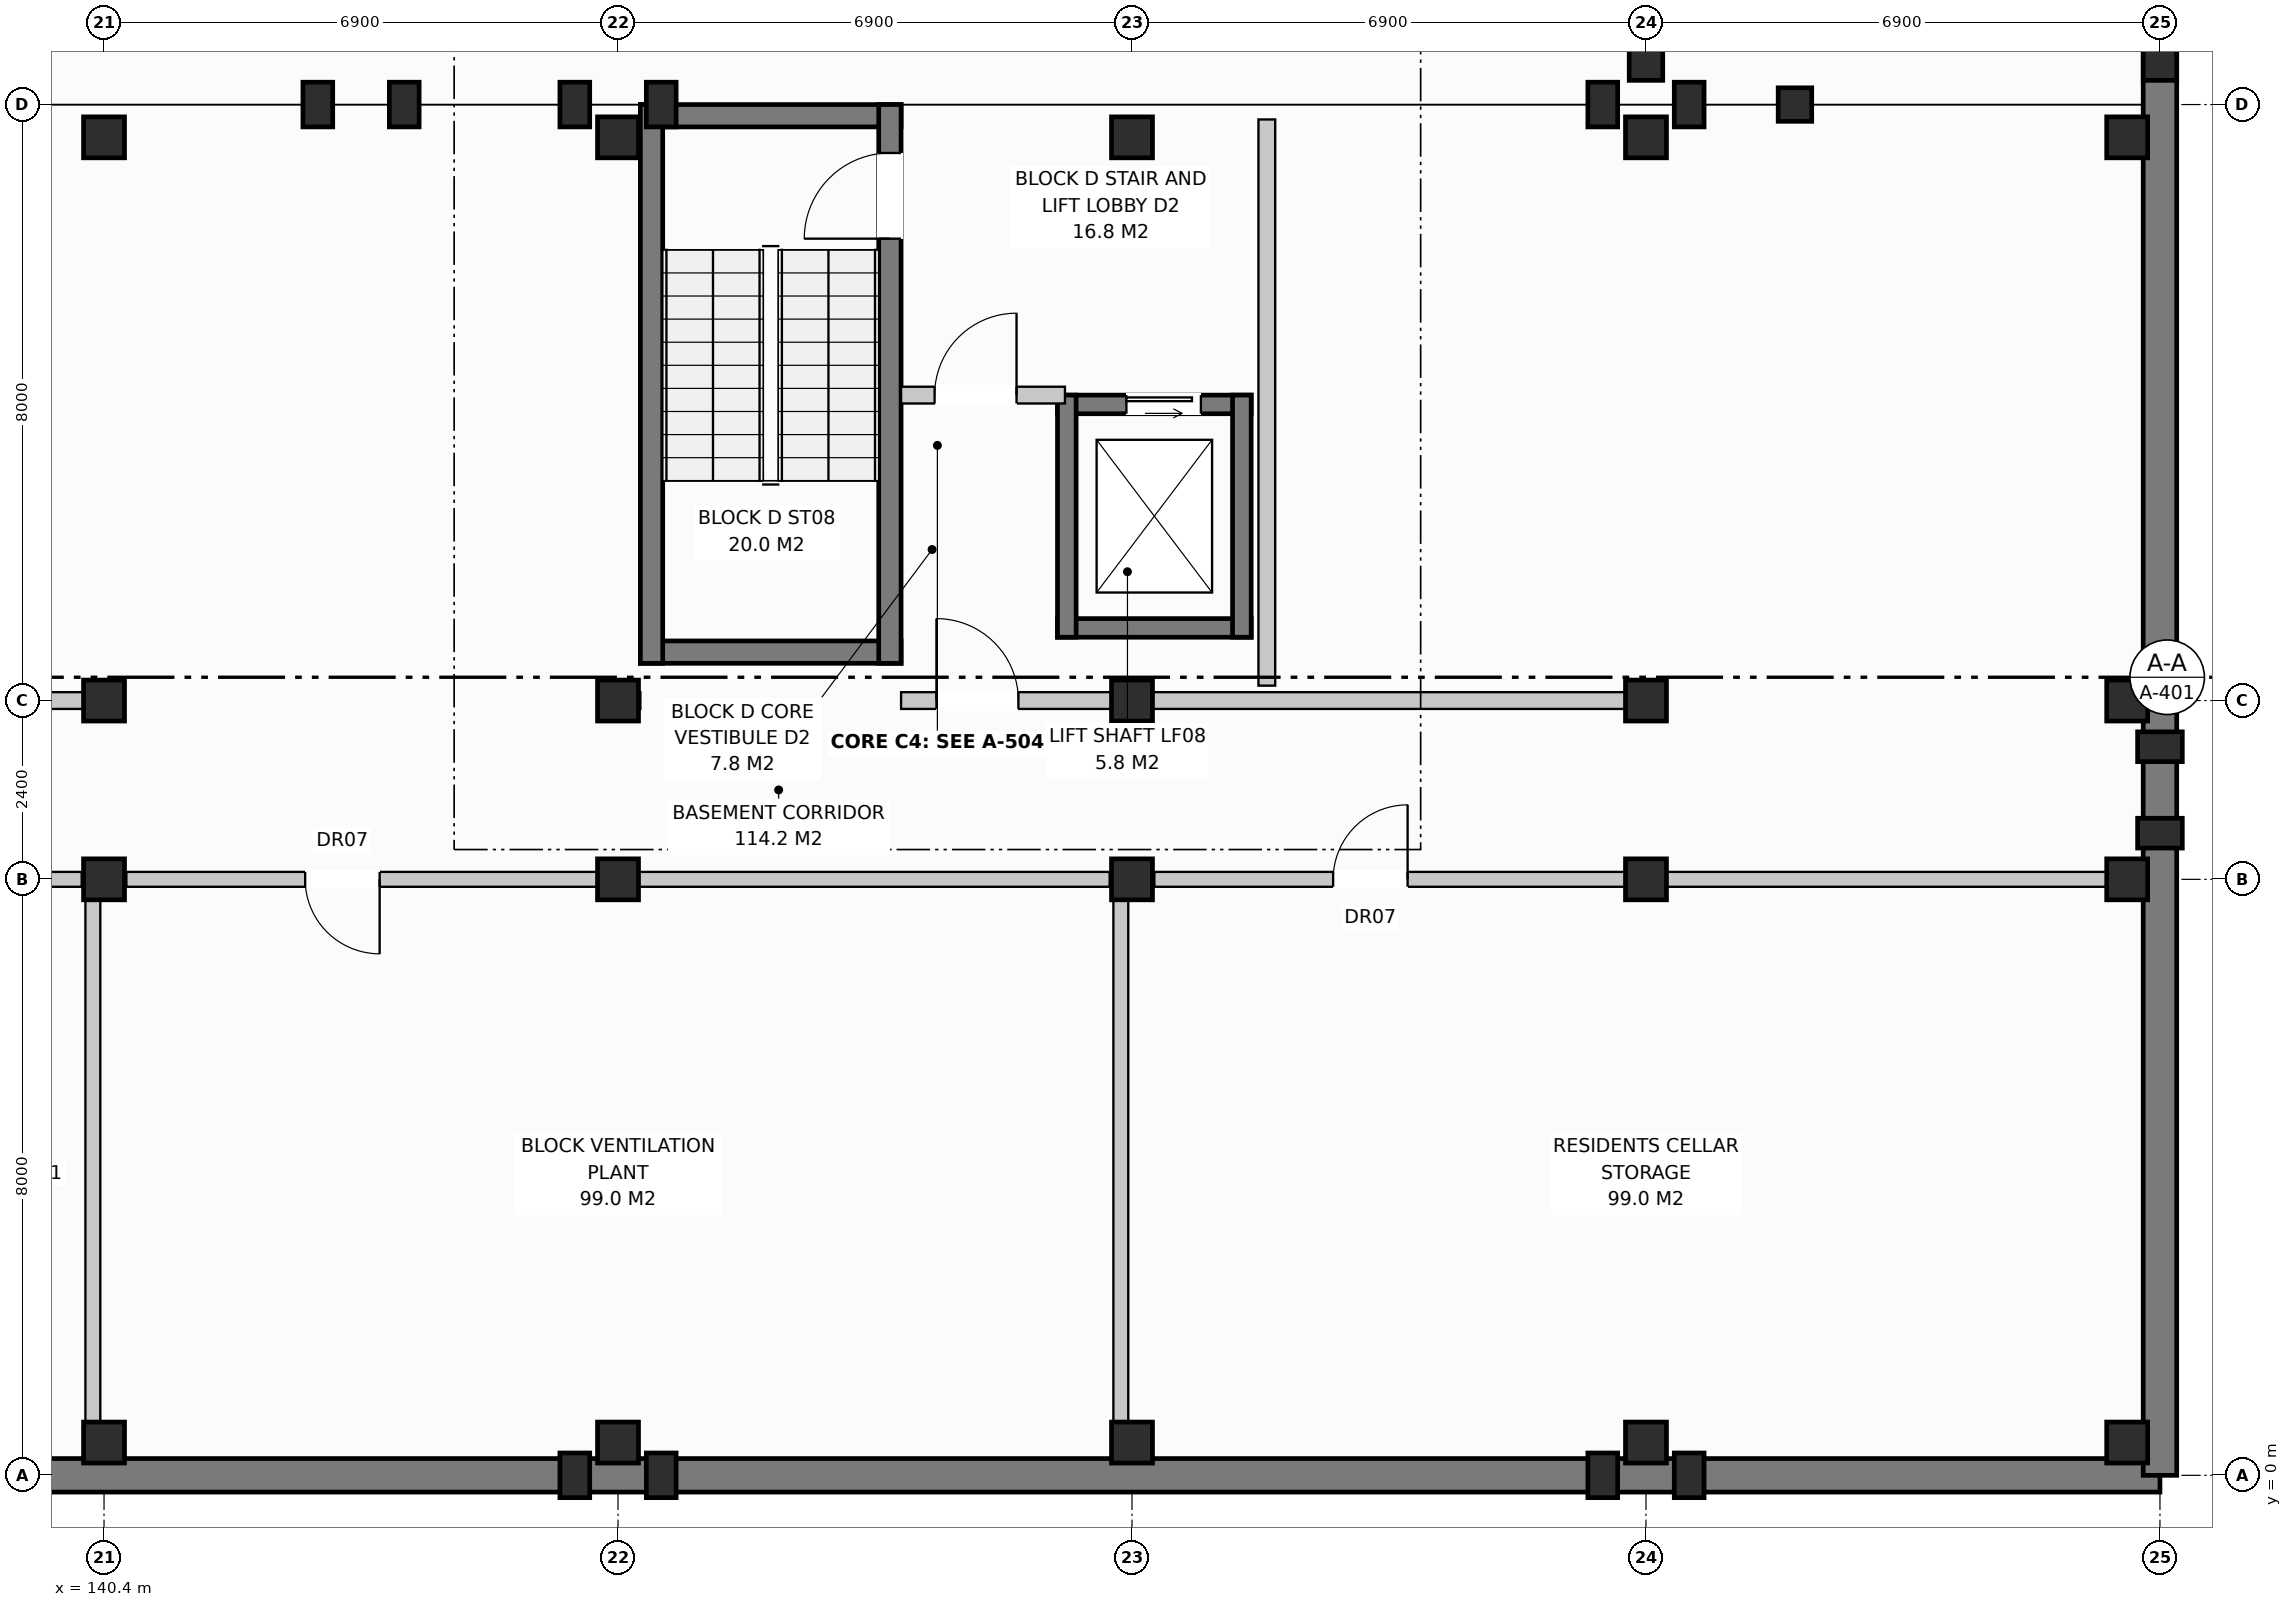
"""IFC4 building model, lengths in metres.
Left out: names, types, materials, properties, quantities, classifications, styles, units other than length and angle.
Written with IfcOpenShell. Run it as: python <this file> out.ifc"""

import sys

from ifc_helpers import new_model, si_unit, direction, frame, frame_2d, origin, origin_with_axes, origin_2d, place, context, subcontext, project, spatial, rectangle, extrude, element, fill, save


model = new_model("IFC4")
c1 = context("Model", 3, precision=1e-05, world=origin(), true_north=direction((0.0, 1.0)))
c2 = subcontext(c1, "Body", "Model", "MODEL_VIEW")
j1 = project(units=[si_unit("LENGTHUNIT", "METRE"), si_unit("PLANEANGLEUNIT", "RADIAN")], contexts=[c1])
p1 = place(None, origin())
s1 = spatial("IfcSite", under=j1, at=p1, CompositionType="ELEMENT")
p2 = place(p1, origin())
s2 = spatial("IfcBuilding", under=s1, at=p2, CompositionType="ELEMENT")
p3 = place(p2, frame((0.0, 0.0, -3.8)))
s3 = spatial("IfcBuildingStorey", under=s2, at=p3, CompositionType="ELEMENT", Elevation=-3.8)
for number, where, z_axis, x_axis in (
    (1, (140.4, 0.44, 0.0), (0.0, 0.0, 1.0), (1.0, 0.0, 0.0)),
    (2, (140.4, 8.0, 0.0), (0.0, 0.0, 1.0), (1.0, 0.0, 0.0)),
    (3, (140.4, 10.4, 0.0), (0.0, 0.0, 1.0), (1.0, 0.0, 0.0)),
    (4, (140.4, 17.96, 0.0), (0.0, 0.0, 1.0), (1.0, 0.0, 0.0)),
    (5, (147.3, 0.44, 0.0), (0.0, 0.0, 1.0), (1.0, 0.0, 0.0)),
    (6, (147.3, 8.0, 0.0), (0.0, 0.0, 1.0), (1.0, 0.0, 0.0)),
    (7, (147.3, 10.4, 0.0), (0.0, 0.0, 1.0), (1.0, 0.0, 0.0)),
    (8, (147.3, 17.96, 0.0), (0.0, 0.0, 1.0), (1.0, 0.0, 0.0)),
    (9, (154.2, 0.44, 0.0), (0.0, 0.0, 1.0), (1.0, 0.0, 0.0)),
    (10, (154.2, 8.0, 0.0), (0.0, 0.0, 1.0), (1.0, 0.0, 0.0)),
    (11, (154.2, 10.4, 0.0), (0.0, 0.0, 1.0), (1.0, 0.0, 0.0)),
    (12, (154.2, 17.96, 0.0), (0.0, 0.0, 1.0), (1.0, 0.0, 0.0)),
    (13, (161.1, 0.44, 0.0), (0.0, 0.0, 1.0), (1.0, 0.0, 0.0)),
    (14, (161.1, 8.0, 0.0), (0.0, 0.0, 1.0), (1.0, 0.0, 0.0)),
    (15, (161.1, 10.4, 0.0), (0.0, 0.0, 1.0), (1.0, 0.0, 0.0)),
    (16, (161.1, 17.96, 0.0), (0.0, 0.0, 1.0), (1.0, 0.0, 0.0)),
    (17, (167.56, 0.44, 0.0), (0.0, 0.0, 1.0), (1.0, 0.0, 0.0)),
    (18, (167.56, 8.0, 0.0), (0.0, 0.0, 1.0), (1.0, 0.0, 0.0)),
    (19, (167.56, 10.4, 0.0), (0.0, 0.0, 1.0), (1.0, 0.0, 0.0)),
    (20, (167.56, 17.96, 0.0), (0.0, 0.0, 1.0), (1.0, 0.0, 0.0)),
):
    element("IfcColumn", number, at=place(p3, frame(where, z_axis=z_axis, x_axis=x_axis)), inside=s3, PredefinedType="COLUMN", context=c2, shape_type="SweptSolid", body=[
        extrude(rectangle(XDim=0.55, YDim=0.55, at=origin_2d()), origin(), (0.0, 0.0, 1.0), 3.8),
    ])
for number, where, z_axis, x_axis in (
    (21, (146.72, 0.0, 0.0), (0.0, 0.0, 1.0), (1.0, 0.0, 0.0)),
    (22, (146.72, 18.4, 0.0), (0.0, 0.0, 1.0), (1.0, 0.0, 0.0)),
    (23, (147.88, 0.0, 0.0), (0.0, 0.0, 1.0), (1.0, 0.0, 0.0)),
    (24, (147.88, 18.4, 0.0), (0.0, 0.0, 1.0), (1.0, 0.0, 0.0)),
    (25, (160.52, 0.0, 0.0), (0.0, 0.0, 1.0), (1.0, 0.0, 0.0)),
    (26, (160.52, 18.4, 0.0), (0.0, 0.0, 1.0), (1.0, 0.0, 0.0)),
    (27, (161.68, 0.0, 0.0), (0.0, 0.0, 1.0), (1.0, 0.0, 0.0)),
    (28, (161.68, 18.4, 0.0), (0.0, 0.0, 1.0), (1.0, 0.0, 0.0)),
    (29, (143.27, 18.4, 0.0), (0.0, 0.0, 1.0), (1.0, 0.0, 0.0)),
    (30, (144.43, 18.4, 0.0), (0.0, 0.0, 1.0), (1.0, 0.0, 0.0)),
    (31, (168.0, 8.62, 0.0), (0.0, 0.0, 1.0), (0.0, 1.0, 0.0)),
    (32, (168.0, 9.78, 0.0), (0.0, 0.0, 1.0), (0.0, 1.0, 0.0)),
):
    element("IfcColumn", number, at=place(p3, frame(where, z_axis=z_axis, x_axis=x_axis)), inside=s3, PredefinedType="PILASTER", context=c2, shape_type="SweptSolid", body=[
        extrude(rectangle(XDim=0.4, YDim=0.6, at=origin_2d()), origin(), (0.0, 0.0, 1.0), 3.8),
    ])
for number, where, z_axis, x_axis in (
    (33, (163.1, 18.4, 0.0), (0.0, 0.0, 1.0), (1.0, 0.0, 0.0)),
    (34, (161.1, 18.95, 0.0), (0.0, 0.0, 1.0), (1.0, 0.0, 0.0)),
    (35, (168.0, 18.95, 0.0), (0.0, 0.0, 1.0), (1.0, 0.0, 0.0)),
):
    element("IfcColumn", number, at=place(p3, frame(where, z_axis=z_axis, x_axis=x_axis)), inside=s3, PredefinedType="COLUMN", context=c2, shape_type="SweptSolid", body=[
        extrude(rectangle(XDim=0.45, YDim=0.45, at=origin_2d()), origin(), (0.0, 0.0, 1.0), 3.8),
    ])
p4 = place(p3, origin_with_axes())
e36 = element("IfcWall", 36, at=p4, inside=s3, PredefinedType="STANDARD", context=c2, shape_type="SweptSolid", body=[
    extrude(rectangle(XDim=168.0, YDim=0.45, at=frame_2d((84.0, 0.0))), origin(), (0.0, 0.0, 1.0), 3.48),
])
p5 = place(p3, frame((168.0, 0.0, 0.0), z_axis=(0.0, 0.0, 1.0), x_axis=(0.0, 1.0, 0.0)))
e37 = element("IfcWall", 37, at=p5, inside=s3, PredefinedType="STANDARD", context=c2, shape_type="SweptSolid", body=[
    extrude(rectangle(XDim=116.0, YDim=0.45, at=frame_2d((58.0, 0.0))), origin(), (0.0, 0.0, 1.0), 3.48),
])
p6 = place(p3, frame((130.4, 10.4, 0.0), z_axis=(0.0, 0.0, 1.0), x_axis=(1.0, 0.0, 0.0)))
e38 = element("IfcWall", 38, at=p6, inside=s3, PredefinedType="PARTITIONING", context=c2, shape_type="SweptSolid", body=[
    extrude(rectangle(XDim=10.0, YDim=0.225, at=frame_2d((5.0, 0.0))), origin(), (0.0, 0.0, 1.0), 2.92),
])
p7 = place(p6, frame((0.475, 0.0, 0.0)))
e39 = element("IfcOpeningElement", 39, at=p7, cuts=e38, PredefinedType="OPENING", context=c2, shape_type="SweptSolid", body=[
    extrude(rectangle(XDim=1.1, YDim=2.15, at=frame_2d((0.55, 1.075))), frame((0.0, 0.125, 0.0), z_axis=(0.0, -1.0, 0.0), x_axis=(1.0, 0.0, 0.0)), (0.0, 0.0, 1.0), 0.249),
])
for number, where, z_axis, x_axis in (
    (40, (147.6, 18.25, 0.0), (0.0, 0.0, 1.0), (1.0, 0.0, 0.0)),
    (41, (147.6, 11.05, 0.0), (0.0, 0.0, 1.0), (1.0, 0.0, 0.0)),
):
    element("IfcWall", number, at=place(p3, frame(where, z_axis=z_axis, x_axis=x_axis)), inside=s3, PredefinedType="SHEAR", context=c2, shape_type="SweptSolid", body=[
        extrude(rectangle(XDim=3.5, YDim=0.3, at=frame_2d((1.75, 0.0))), origin(), (0.0, 0.0, 1.0), 3.48),
    ])
p8 = place(p3, frame((147.75, 10.9, 0.0), z_axis=(0.0, 0.0, 1.0), x_axis=(0.0, 1.0, 0.0)))
e42 = element("IfcWall", 42, at=p8, inside=s3, PredefinedType="SHEAR", context=c2, shape_type="SweptSolid", body=[
    extrude(rectangle(XDim=7.5, YDim=0.3, at=frame_2d((3.75, 0.0))), origin(), (0.0, 0.0, 1.0), 3.48),
])
p9 = place(p3, frame((150.95, 10.9, 0.0), z_axis=(0.0, 0.0, 1.0), x_axis=(0.0, 1.0, 0.0)))
e43 = element("IfcWall", 43, at=p9, inside=s3, PredefinedType="SHEAR", context=c2, shape_type="SweptSolid", body=[
    extrude(rectangle(XDim=7.5, YDim=0.3, at=frame_2d((3.75, 0.0))), origin(), (0.0, 0.0, 1.0), 3.48),
])
p10 = place(p9, frame((5.7, 0.0, 0.0)))
e44 = element("IfcOpeningElement", 44, at=p10, cuts=e43, PredefinedType="OPENING", context=c2, shape_type="SweptSolid", body=[
    extrude(rectangle(XDim=1.15, YDim=2.15, at=frame_2d((0.575, 1.075))), frame((0.0, 0.162, 0.0), z_axis=(0.0, -1.0, 0.0), x_axis=(1.0, 0.0, 0.0)), (0.0, 0.0, 1.0), 0.324),
])
p11 = place(p3, frame((153.2, 14.375, 0.0), z_axis=(0.0, 0.0, 1.0), x_axis=(1.0, 0.0, 0.0)))
e45 = element("IfcWall", 45, at=p11, inside=s3, PredefinedType="SHEAR", context=c2, shape_type="SweptSolid", body=[
    extrude(rectangle(XDim=2.6, YDim=0.25, at=frame_2d((1.3, 0.0))), origin(), (0.0, 0.0, 1.0), 3.48),
])
p12 = place(p11, frame((0.925, 0.0, 0.0)))
e46 = element("IfcOpeningElement", 46, at=p12, cuts=e45, PredefinedType="OPENING", context=c2, shape_type="SweptSolid", body=[
    extrude(rectangle(XDim=1.0, YDim=2.1, at=frame_2d((0.5, 1.05))), frame((0.0, 0.137, 0.0), z_axis=(0.0, -1.0, 0.0), x_axis=(1.0, 0.0, 0.0)), (0.0, 0.0, 1.0), 0.274),
])
p13 = place(p3, frame((153.2, 11.375, 0.0), z_axis=(0.0, 0.0, 1.0), x_axis=(1.0, 0.0, 0.0)))
e47 = element("IfcWall", 47, at=p13, inside=s3, PredefinedType="SHEAR", context=c2, shape_type="SweptSolid", body=[
    extrude(rectangle(XDim=2.6, YDim=0.25, at=frame_2d((1.3, 0.0))), origin(), (0.0, 0.0, 1.0), 3.48),
])
for number, where, z_axis, x_axis in (
    (48, (153.325, 11.25, 0.0), (0.0, 0.0, 1.0), (0.0, 1.0, 0.0)),
    (49, (155.675, 11.25, 0.0), (0.0, 0.0, 1.0), (0.0, 1.0, 0.0)),
):
    element("IfcWall", number, at=place(p3, frame(where, z_axis=z_axis, x_axis=x_axis)), inside=s3, PredefinedType="SHEAR", context=c2, shape_type="SweptSolid", body=[
        extrude(rectangle(XDim=3.25, YDim=0.25, at=frame_2d((1.625, 0.0))), origin(), (0.0, 0.0, 1.0), 3.48),
    ])
p14 = place(p3, frame((156.01, 10.6, 0.0), z_axis=(0.0, 0.0, 1.0), x_axis=(0.0, 1.0, 0.0)))
e50 = element("IfcWall", 50, at=p14, inside=s3, PredefinedType="PARTITIONING", context=c2, shape_type="SweptSolid", body=[
    extrude(rectangle(XDim=7.6, YDim=0.225, at=frame_2d((3.8, 0.0))), origin(), (0.0, 0.0, 1.0), 3.19),
])
p15 = place(p3, frame((151.1, 14.5, 0.0), z_axis=(0.0, 0.0, 1.0), x_axis=(1.0, 0.0, 0.0)))
e51 = element("IfcWall", 51, at=p15, inside=s3, PredefinedType="PARTITIONING", context=c2, shape_type="SweptSolid", body=[
    extrude(rectangle(XDim=2.2, YDim=0.225, at=frame_2d((1.1, 0.0))), origin(), (0.0, 0.0, 1.0), 3.48),
])
p16 = place(p15, frame((0.45, 0.0, 0.0)))
e52 = element("IfcOpeningElement", 52, at=p16, cuts=e51, PredefinedType="OPENING", context=c2, shape_type="SweptSolid", body=[
    extrude(rectangle(XDim=1.1, YDim=2.15, at=frame_2d((0.55, 1.075))), frame((0.0, 0.125, 0.0), z_axis=(0.0, -1.0, 0.0), x_axis=(1.0, 0.0, 0.0)), (0.0, 0.0, 1.0), 0.249),
])
p17 = place(p3, frame((147.3, 10.4, 0.0), z_axis=(0.0, 0.0, 1.0), x_axis=(1.0, 0.0, 0.0)))
e53 = element("IfcWall", 53, at=p17, inside=s3, PredefinedType="PARTITIONING", context=c2, shape_type="SweptSolid", body=[
    extrude(rectangle(XDim=0.3, YDim=0.225, at=frame_2d((0.15, 0.0))), origin(), (0.0, 0.0, 1.0), 3.48),
])
p18 = place(p3, frame((151.1, 10.4, 0.0), z_axis=(0.0, 0.0, 1.0), x_axis=(1.0, 0.0, 0.0)))
e54 = element("IfcWall", 54, at=p18, inside=s3, PredefinedType="PARTITIONING", context=c2, shape_type="SweptSolid", body=[
    extrude(rectangle(XDim=10.0, YDim=0.225, at=frame_2d((5.0, 0.0))), origin(), (0.0, 0.0, 1.0), 2.92),
])
p19 = place(p18, frame((0.475, 0.0, 0.0)))
e55 = element("IfcOpeningElement", 55, at=p19, cuts=e54, PredefinedType="OPENING", context=c2, shape_type="SweptSolid", body=[
    extrude(rectangle(XDim=1.1, YDim=2.15, at=frame_2d((0.55, 1.075))), frame((0.0, 0.125, 0.0), z_axis=(0.0, -1.0, 0.0), x_axis=(1.0, 0.0, 0.0)), (0.0, 0.0, 1.0), 0.249),
])
p20 = place(p3, frame((126.9, 8.0, 0.0), z_axis=(0.0, 0.0, 1.0), x_axis=(1.0, 0.0, 0.0)))
e56 = element("IfcWall", 56, at=p20, inside=s3, PredefinedType="PARTITIONING", context=c2, shape_type="SweptSolid", body=[
    extrude(rectangle(XDim=13.2, YDim=0.2, at=frame_2d((6.6, 0.0))), origin(), (0.0, 0.0, 1.0), 2.92),
])
p21 = place(p20, frame((2.4, 0.0, 0.0)))
e57 = element("IfcOpeningElement", 57, at=p21, cuts=e56, PredefinedType="OPENING", context=c2, shape_type="SweptSolid", body=[
    extrude(rectangle(XDim=1.0, YDim=2.15, at=frame_2d((0.5, 1.075))), frame((0.0, 0.112, 0.0), z_axis=(0.0, -1.0, 0.0), x_axis=(1.0, 0.0, 0.0)), (0.0, 0.0, 1.0), 0.224),
])
p22 = place(p3, frame((140.25, 0.3, 0.0), z_axis=(0.0, 0.0, 1.0), x_axis=(0.0, 1.0, 0.0)))
e58 = element("IfcWall", 58, at=p22, inside=s3, PredefinedType="PARTITIONING", context=c2, shape_type="SweptSolid", body=[
    extrude(rectangle(XDim=7.5, YDim=0.2, at=frame_2d((3.75, 0.0))), origin(), (0.0, 0.0, 1.0), 3.48),
])
p23 = place(p3, frame((140.7, 8.0, 0.0), z_axis=(0.0, 0.0, 1.0), x_axis=(1.0, 0.0, 0.0)))
e59 = element("IfcWall", 59, at=p23, inside=s3, PredefinedType="PARTITIONING", context=c2, shape_type="SweptSolid", body=[
    extrude(rectangle(XDim=13.2, YDim=0.2, at=frame_2d((6.6, 0.0))), origin(), (0.0, 0.0, 1.0), 2.92),
])
p24 = place(p23, frame((2.4, 0.0, 0.0)))
e60 = element("IfcOpeningElement", 60, at=p24, cuts=e59, PredefinedType="OPENING", context=c2, shape_type="SweptSolid", body=[
    extrude(rectangle(XDim=1.0, YDim=2.15, at=frame_2d((0.5, 1.075))), frame((0.0, 0.112, 0.0), z_axis=(0.0, -1.0, 0.0), x_axis=(1.0, 0.0, 0.0)), (0.0, 0.0, 1.0), 0.224),
])
p25 = place(p3, frame((154.05, 0.3, 0.0), z_axis=(0.0, 0.0, 1.0), x_axis=(0.0, 1.0, 0.0)))
e61 = element("IfcWall", 61, at=p25, inside=s3, PredefinedType="PARTITIONING", context=c2, shape_type="SweptSolid", body=[
    extrude(rectangle(XDim=7.5, YDim=0.2, at=frame_2d((3.75, 0.0))), origin(), (0.0, 0.0, 1.0), 3.48),
])
p26 = place(p3, frame((154.5, 8.0, 0.0), z_axis=(0.0, 0.0, 1.0), x_axis=(1.0, 0.0, 0.0)))
e62 = element("IfcWall", 62, at=p26, inside=s3, PredefinedType="PARTITIONING", context=c2, shape_type="SweptSolid", body=[
    extrude(rectangle(XDim=13.2, YDim=0.2, at=frame_2d((6.6, 0.0))), origin(), (0.0, 0.0, 1.0), 2.92),
])
p27 = place(p26, frame((2.4, 0.0, 0.0)))
e63 = element("IfcOpeningElement", 63, at=p27, cuts=e62, PredefinedType="OPENING", context=c2, shape_type="SweptSolid", body=[
    extrude(rectangle(XDim=1.0, YDim=2.15, at=frame_2d((0.5, 1.075))), frame((0.0, 0.112, 0.0), z_axis=(0.0, -1.0, 0.0), x_axis=(1.0, 0.0, 0.0)), (0.0, 0.0, 1.0), 0.224),
])
p28 = place(p10, origin_with_axes())
e64 = element("IfcDoor", 64, at=p28, inside=s3, OperationType="SINGLE_SWING_LEFT", PredefinedType="DOOR", context=c2, shape_type="SweptSolid", body=[
    extrude(rectangle(XDim=1.15, YDim=2.15, at=frame_2d((0.575, 1.075))), frame((0.0, 0.025, 0.0), z_axis=(0.0, -1.0, 0.0), x_axis=(1.0, 0.0, 0.0)), (0.0, 0.0, 1.0), 0.05),
])
fill(e44, e64)
p29 = place(p12, origin_with_axes())
e65 = element("IfcDoor", 65, at=p29, inside=s3, OperationType="SLIDING_TO_LEFT", PredefinedType="DOOR", context=c2, shape_type="SweptSolid", body=[
    extrude(rectangle(XDim=1.0, YDim=2.1, at=frame_2d((0.5, 1.05))), frame((0.0, 0.025, 0.0), z_axis=(0.0, -1.0, 0.0), x_axis=(1.0, 0.0, 0.0)), (0.0, 0.0, 1.0), 0.05),
])
fill(e46, e65)
p30 = place(p16, origin_with_axes())
e66 = element("IfcDoor", 66, at=p30, inside=s3, OperationType="SINGLE_SWING_RIGHT", PredefinedType="DOOR", context=c2, shape_type="SweptSolid", body=[
    extrude(rectangle(XDim=1.1, YDim=2.15, at=frame_2d((0.55, 1.075))), frame((0.0, 0.025, 0.0), z_axis=(0.0, -1.0, 0.0), x_axis=(1.0, 0.0, 0.0)), (0.0, 0.0, 1.0), 0.05),
])
fill(e52, e66)
p31 = place(p19, origin_with_axes())
e67 = element("IfcDoor", 67, at=p31, inside=s3, OperationType="SINGLE_SWING_LEFT", PredefinedType="DOOR", context=c2, shape_type="SweptSolid", body=[
    extrude(rectangle(XDim=1.1, YDim=2.15, at=frame_2d((0.55, 1.075))), frame((0.0, 0.025, 0.0), z_axis=(0.0, -1.0, 0.0), x_axis=(1.0, 0.0, 0.0)), (0.0, 0.0, 1.0), 0.05),
])
fill(e55, e67)
p32 = place(p24, frame((1.0, 0.0, 0.0), z_axis=(0.0, 0.0, 1.0), x_axis=(-1.0, 0.0, 0.0)))
e68 = element("IfcDoor", 68, at=p32, inside=s3, OperationType="SINGLE_SWING_RIGHT", PredefinedType="DOOR", context=c2, shape_type="SweptSolid", body=[
    extrude(rectangle(XDim=1.0, YDim=2.15, at=frame_2d((0.5, 1.075))), frame((0.0, 0.025, 0.0), z_axis=(0.0, -1.0, 0.0), x_axis=(1.0, 0.0, 0.0)), (0.0, 0.0, 1.0), 0.05),
])
fill(e60, e68)
p33 = place(p27, origin_with_axes())
e69 = element("IfcDoor", 69, at=p33, inside=s3, OperationType="SINGLE_SWING_RIGHT", PredefinedType="DOOR", context=c2, shape_type="SweptSolid", body=[
    extrude(rectangle(XDim=1.0, YDim=2.15, at=frame_2d((0.5, 1.075))), frame((0.0, 0.025, 0.0), z_axis=(0.0, -1.0, 0.0), x_axis=(1.0, 0.0, 0.0)), (0.0, 0.0, 1.0), 0.05),
])
fill(e63, e69)
save(model, sys.argv[1])
